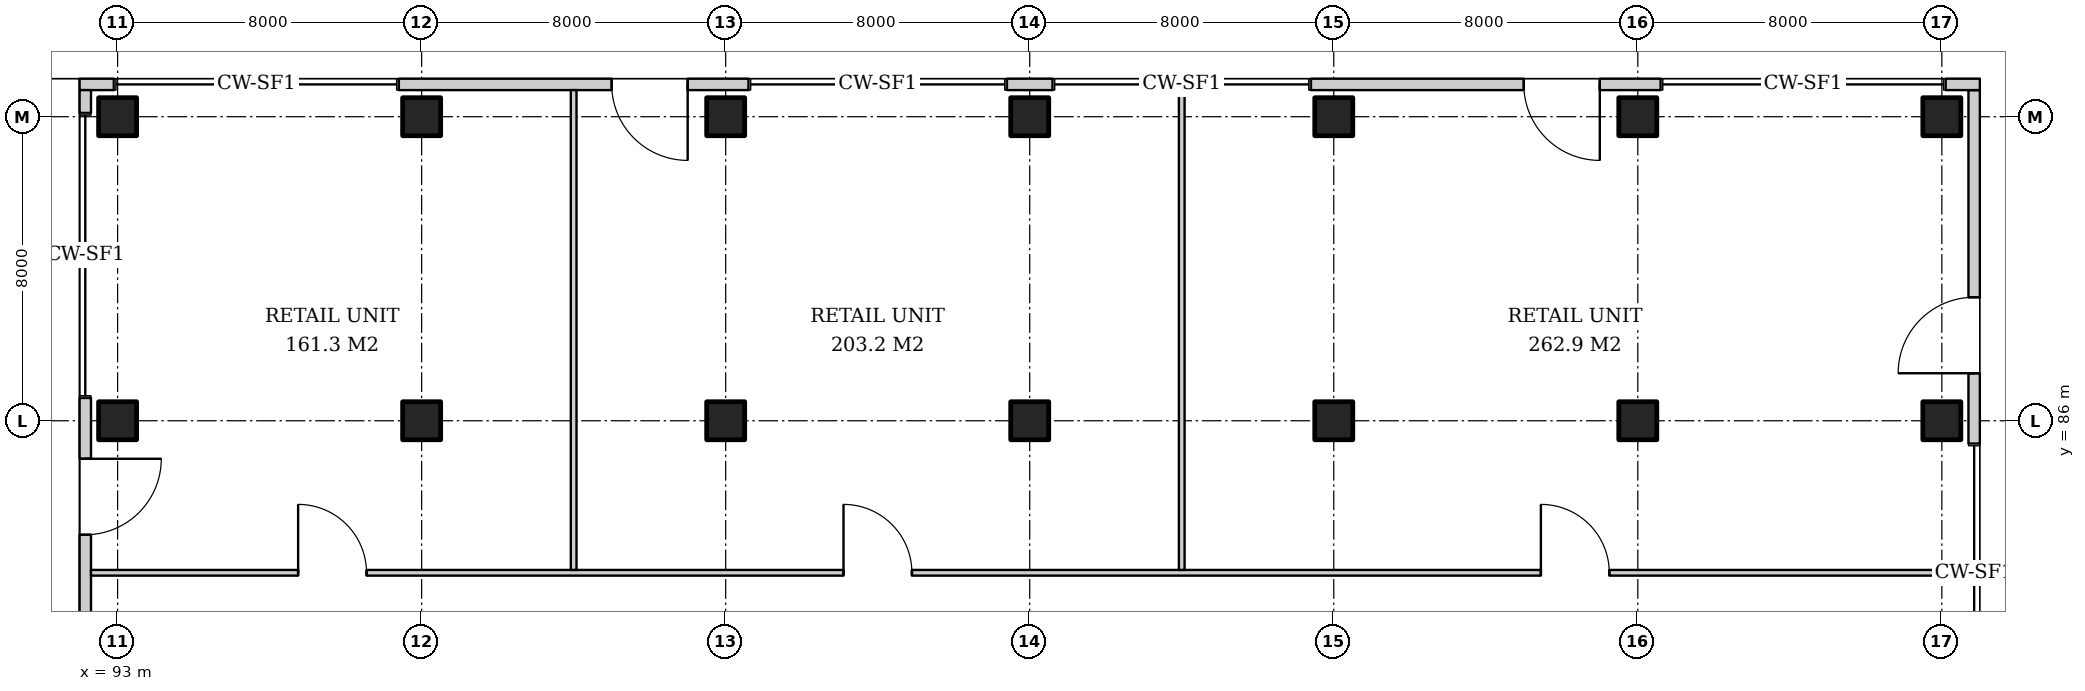
"""IFC4 building model, lengths in metres.
Left out: names, types, materials, properties, quantities, classifications, styles, units other than length and angle.
Written with IfcOpenShell. Run it as: python <this file> out.ifc"""

import sys

from ifc_helpers import new_model, si_unit, direction, frame, frame_2d, origin, origin_2d, place, context, subcontext, project, spatial, rectangle, extrude, element, fill, save


model = new_model("IFC4")
c1 = context("Model", 3, precision=1e-05, world=origin(), true_north=direction((0.0, 1.0)))
c2 = subcontext(c1, "Body", "Model", "MODEL_VIEW")
j1 = project(units=[si_unit("LENGTHUNIT", "METRE"), si_unit("PLANEANGLEUNIT", "RADIAN")], contexts=[c1])
p1 = place(None, origin())
s1 = spatial("IfcSite", under=j1, at=p1, CompositionType="ELEMENT")
p2 = place(p1, origin())
s2 = spatial("IfcBuilding", under=s1, at=p2, CompositionType="ELEMENT")
p3 = place(p2, origin())
s3 = spatial("IfcBuildingStorey", under=s2, at=p3, CompositionType="ELEMENT", Elevation=0.0)
for number, where, z_axis, x_axis in (
    (1, (93.0, 86.0, 0.0), (0.0, 0.0, 1.0), (1.0, 0.0, 0.0)),
    (2, (93.0, 94.0, 0.0), (0.0, 0.0, 1.0), (1.0, 0.0, 0.0)),
    (3, (101.0, 86.0, 0.0), (0.0, 0.0, 1.0), (1.0, 0.0, 0.0)),
    (4, (101.0, 94.0, 0.0), (0.0, 0.0, 1.0), (1.0, 0.0, 0.0)),
    (5, (109.0, 86.0, 0.0), (0.0, 0.0, 1.0), (1.0, 0.0, 0.0)),
    (6, (109.0, 94.0, 0.0), (0.0, 0.0, 1.0), (1.0, 0.0, 0.0)),
    (7, (117.0, 86.0, 0.0), (0.0, 0.0, 1.0), (1.0, 0.0, 0.0)),
    (8, (117.0, 94.0, 0.0), (0.0, 0.0, 1.0), (1.0, 0.0, 0.0)),
    (9, (125.0, 86.0, 0.0), (0.0, 0.0, 1.0), (1.0, 0.0, 0.0)),
    (10, (125.0, 94.0, 0.0), (0.0, 0.0, 1.0), (1.0, 0.0, 0.0)),
    (11, (133.0, 86.0, 0.0), (0.0, 0.0, 1.0), (1.0, 0.0, 0.0)),
    (12, (133.0, 94.0, 0.0), (0.0, 0.0, 1.0), (1.0, 0.0, 0.0)),
    (13, (141.0, 86.0, 0.0), (0.0, 0.0, 1.0), (1.0, 0.0, 0.0)),
    (14, (141.0, 94.0, 0.0), (0.0, 0.0, 1.0), (1.0, 0.0, 0.0)),
):
    element("IfcColumn", number, at=place(p3, frame(where, z_axis=z_axis, x_axis=x_axis)), inside=s3, PredefinedType="COLUMN", context=c2, shape_type="SweptSolid", body=[
        extrude(rectangle(XDim=1.0, YDim=1.0, at=origin_2d()), origin(), (0.0, 0.0, 1.0), 6.0),
    ])
p4 = place(p3, frame((141.85, 85.4, 0.0), z_axis=(0.0, 0.0, 1.0), x_axis=(0.0, 1.0, 0.0)))
e15 = element("IfcWall", 15, at=p4, inside=s3, PredefinedType="SOLIDWALL", context=c2, shape_type="SweptSolid", body=[
    extrude(rectangle(XDim=9.3, YDim=0.3, at=frame_2d((4.65, 0.0))), origin(), (0.0, 0.0, 1.0), 5.7),
])
p5 = place(p4, frame((1.85, 0.0, 0.0)))
e16 = element("IfcOpeningElement", 16, at=p5, cuts=e15, PredefinedType="OPENING", context=c2, shape_type="SweptSolid", body=[
    extrude(rectangle(XDim=2.0, YDim=2.7, at=frame_2d((1.0, 1.35))), frame((0.0, 0.16, 0.0), z_axis=(0.0, -1.0, 0.0), x_axis=(1.0, 0.0, 0.0)), (0.0, 0.0, 1.0), 0.32),
])
p6 = place(p3, frame((142.0, 94.85, 0.0), z_axis=(0.0, 0.0, 1.0), x_axis=(-1.0, 0.0, 0.0)))
e17 = element("IfcWall", 17, at=p6, inside=s3, PredefinedType="SOLIDWALL", context=c2, shape_type="SweptSolid", body=[
    extrude(rectangle(XDim=0.9, YDim=0.3, at=frame_2d((0.45, 0.0))), origin(), (0.0, 0.0, 1.0), 5.7),
])
p7 = place(p3, frame((133.6, 94.85, 0.0), z_axis=(0.0, 0.0, 1.0), x_axis=(-1.0, 0.0, 0.0)))
e18 = element("IfcWall", 18, at=p7, inside=s3, PredefinedType="SOLIDWALL", context=c2, shape_type="SweptSolid", body=[
    extrude(rectangle(XDim=9.2, YDim=0.3, at=frame_2d((4.6, 0.0))), origin(), (0.0, 0.0, 1.0), 5.7),
])
p8 = place(p7, frame((1.6, 0.0, 0.0)))
e19 = element("IfcOpeningElement", 19, at=p8, cuts=e18, PredefinedType="OPENING", context=c2, shape_type="SweptSolid", body=[
    extrude(rectangle(XDim=2.0, YDim=2.7, at=frame_2d((1.0, 1.35))), frame((0.0, 0.16, 0.0), z_axis=(0.0, -1.0, 0.0), x_axis=(1.0, 0.0, 0.0)), (0.0, 0.0, 1.0), 0.32),
])
p9 = place(p3, frame((117.6, 94.85, 0.0), z_axis=(0.0, 0.0, 1.0), x_axis=(-1.0, 0.0, 0.0)))
e20 = element("IfcWall", 20, at=p9, inside=s3, PredefinedType="SOLIDWALL", context=c2, shape_type="SweptSolid", body=[
    extrude(rectangle(XDim=1.2, YDim=0.3, at=frame_2d((0.6, 0.0))), origin(), (0.0, 0.0, 1.0), 5.7),
])
p10 = place(p3, frame((109.6, 94.85, 0.0), z_axis=(0.0, 0.0, 1.0), x_axis=(-1.0, 0.0, 0.0)))
e21 = element("IfcWall", 21, at=p10, inside=s3, PredefinedType="SOLIDWALL", context=c2, shape_type="SweptSolid", body=[
    extrude(rectangle(XDim=9.2, YDim=0.3, at=frame_2d((4.6, 0.0))), origin(), (0.0, 0.0, 1.0), 5.7),
])
p11 = place(p10, frame((1.6, 0.0, 0.0)))
e22 = element("IfcOpeningElement", 22, at=p11, cuts=e21, PredefinedType="OPENING", context=c2, shape_type="SweptSolid", body=[
    extrude(rectangle(XDim=2.0, YDim=2.7, at=frame_2d((1.0, 1.35))), frame((0.0, 0.16, 0.0), z_axis=(0.0, -1.0, 0.0), x_axis=(1.0, 0.0, 0.0)), (0.0, 0.0, 1.0), 0.32),
])
p12 = place(p3, frame((92.9, 94.85, 0.0), z_axis=(0.0, 0.0, 1.0), x_axis=(-1.0, 0.0, 0.0)))
e23 = element("IfcWall", 23, at=p12, inside=s3, PredefinedType="SOLIDWALL", context=c2, shape_type="SweptSolid", body=[
    extrude(rectangle(XDim=0.9, YDim=0.3, at=frame_2d((0.45, 0.0))), origin(), (0.0, 0.0, 1.0), 5.7),
])
p13 = place(p3, frame((92.15, 94.7, 0.0), z_axis=(0.0, 0.0, 1.0), x_axis=(0.0, -1.0, 0.0)))
e24 = element("IfcWall", 24, at=p13, inside=s3, PredefinedType="SOLIDWALL", context=c2, shape_type="SweptSolid", body=[
    extrude(rectangle(XDim=0.6, YDim=0.3, at=frame_2d((0.3, 0.0))), origin(), (0.0, 0.0, 1.0), 5.7),
])
p14 = place(p3, frame((92.15, 86.6, 0.0), z_axis=(0.0, 0.0, 1.0), x_axis=(0.0, -1.0, 0.0)))
e25 = element("IfcWall", 25, at=p14, inside=s3, PredefinedType="SOLIDWALL", context=c2, shape_type="SweptSolid", body=[
    extrude(rectangle(XDim=17.2, YDim=0.3, at=frame_2d((8.6, 0.0))), origin(), (0.0, 0.0, 1.0), 5.7),
])
p15 = place(p14, frame((1.6, 0.0, 0.0)))
e26 = element("IfcOpeningElement", 26, at=p15, cuts=e25, PredefinedType="OPENING", context=c2, shape_type="SweptSolid", body=[
    extrude(rectangle(XDim=2.0, YDim=2.7, at=frame_2d((1.0, 1.35))), frame((0.0, 0.16, 0.0), z_axis=(0.0, -1.0, 0.0), x_axis=(1.0, 0.0, 0.0)), (0.0, 0.0, 1.0), 0.32),
])
p16 = place(p14, frame((9.6, 0.0, 0.0)))
e27 = element("IfcOpeningElement", 27, at=p16, cuts=e25, PredefinedType="OPENING", context=c2, shape_type="SweptSolid", body=[
    extrude(rectangle(XDim=2.0, YDim=2.7, at=frame_2d((1.0, 1.35))), frame((0.0, 0.16, 0.0), z_axis=(0.0, -1.0, 0.0), x_axis=(1.0, 0.0, 0.0)), (0.0, 0.0, 1.0), 0.32),
])
p17 = place(p3, frame((92.3, 82.0, 0.0), z_axis=(0.0, 0.0, 1.0), x_axis=(1.0, 0.0, 0.0)))
e28 = element("IfcWall", 28, at=p17, inside=s3, PredefinedType="PARTITIONING", context=c2, shape_type="SweptSolid", body=[
    extrude(rectangle(XDim=49.4, YDim=0.15, at=frame_2d((24.7, 0.0))), origin(), (0.0, 0.0, 1.0), 5.7),
])
p18 = place(p17, frame((5.45, 0.0, 0.0)))
e29 = element("IfcOpeningElement", 29, at=p18, cuts=e28, PredefinedType="OPENING", context=c2, shape_type="SweptSolid", body=[
    extrude(rectangle(XDim=1.8, YDim=2.4, at=frame_2d((0.9, 1.2))), frame((0.0, 0.085, 0.0), z_axis=(0.0, -1.0, 0.0), x_axis=(1.0, 0.0, 0.0)), (0.0, 0.0, 1.0), 0.17),
])
p19 = place(p17, frame((19.8, 0.0, 0.0)))
e30 = element("IfcOpeningElement", 30, at=p19, cuts=e28, PredefinedType="OPENING", context=c2, shape_type="SweptSolid", body=[
    extrude(rectangle(XDim=1.8, YDim=2.4, at=frame_2d((0.9, 1.2))), frame((0.0, 0.085, 0.0), z_axis=(0.0, -1.0, 0.0), x_axis=(1.0, 0.0, 0.0)), (0.0, 0.0, 1.0), 0.17),
])
p20 = place(p17, frame((38.15, 0.0, 0.0)))
e31 = element("IfcOpeningElement", 31, at=p20, cuts=e28, PredefinedType="OPENING", context=c2, shape_type="SweptSolid", body=[
    extrude(rectangle(XDim=1.8, YDim=2.4, at=frame_2d((0.9, 1.2))), frame((0.0, 0.085, 0.0), z_axis=(0.0, -1.0, 0.0), x_axis=(1.0, 0.0, 0.0)), (0.0, 0.0, 1.0), 0.17),
])
for number, where, z_axis, x_axis in (
    (32, (105.0, 82.075, 0.0), (0.0, 0.0, 1.0), (0.0, 1.0, 0.0)),
    (33, (121.0, 82.075, 0.0), (0.0, 0.0, 1.0), (0.0, 1.0, 0.0)),
):
    element("IfcWall", number, at=place(p3, frame(where, z_axis=z_axis, x_axis=x_axis)), inside=s3, PredefinedType="PARTITIONING", context=c2, shape_type="SweptSolid", body=[
        extrude(rectangle(XDim=12.625, YDim=0.15, at=frame_2d((6.312, 0.0))), origin(), (0.0, 0.0, 1.0), 4.2),
    ])
p21 = place(p5, origin())
e34 = element("IfcDoor", 34, at=p21, inside=s3, OperationType="DOUBLE_DOOR_SINGLE_SWING", PredefinedType="DOOR", context=c2, shape_type="SweptSolid", body=[
    extrude(rectangle(XDim=2.0, YDim=2.7, at=frame_2d((1.0, 1.35))), frame((0.0, 0.025, 0.0), z_axis=(0.0, -1.0, 0.0), x_axis=(1.0, 0.0, 0.0)), (0.0, 0.0, 1.0), 0.05),
])
fill(e16, e34)
p22 = place(p8, origin())
e35 = element("IfcDoor", 35, at=p22, inside=s3, OperationType="DOUBLE_DOOR_SINGLE_SWING", PredefinedType="DOOR", context=c2, shape_type="SweptSolid", body=[
    extrude(rectangle(XDim=2.0, YDim=2.7, at=frame_2d((1.0, 1.35))), frame((0.0, 0.025, 0.0), z_axis=(0.0, -1.0, 0.0), x_axis=(1.0, 0.0, 0.0)), (0.0, 0.0, 1.0), 0.05),
])
fill(e19, e35)
p23 = place(p11, origin())
e36 = element("IfcDoor", 36, at=p23, inside=s3, OperationType="DOUBLE_DOOR_SINGLE_SWING", PredefinedType="DOOR", context=c2, shape_type="SweptSolid", body=[
    extrude(rectangle(XDim=2.0, YDim=2.7, at=frame_2d((1.0, 1.35))), frame((0.0, 0.025, 0.0), z_axis=(0.0, -1.0, 0.0), x_axis=(1.0, 0.0, 0.0)), (0.0, 0.0, 1.0), 0.05),
])
fill(e22, e36)
p24 = place(p15, origin())
e37 = element("IfcDoor", 37, at=p24, inside=s3, OperationType="DOUBLE_DOOR_SINGLE_SWING", PredefinedType="DOOR", context=c2, shape_type="SweptSolid", body=[
    extrude(rectangle(XDim=2.0, YDim=2.7, at=frame_2d((1.0, 1.35))), frame((0.0, 0.025, 0.0), z_axis=(0.0, -1.0, 0.0), x_axis=(1.0, 0.0, 0.0)), (0.0, 0.0, 1.0), 0.05),
])
fill(e26, e37)
p25 = place(p18, origin())
e38 = element("IfcDoor", 38, at=p25, inside=s3, OperationType="DOUBLE_DOOR_SINGLE_SWING", PredefinedType="DOOR", context=c2, shape_type="SweptSolid", body=[
    extrude(rectangle(XDim=1.8, YDim=2.4, at=frame_2d((0.9, 1.2))), frame((0.0, 0.025, 0.0), z_axis=(0.0, -1.0, 0.0), x_axis=(1.0, 0.0, 0.0)), (0.0, 0.0, 1.0), 0.05),
])
fill(e29, e38)
p26 = place(p19, origin())
e39 = element("IfcDoor", 39, at=p26, inside=s3, OperationType="DOUBLE_DOOR_SINGLE_SWING", PredefinedType="DOOR", context=c2, shape_type="SweptSolid", body=[
    extrude(rectangle(XDim=1.8, YDim=2.4, at=frame_2d((0.9, 1.2))), frame((0.0, 0.025, 0.0), z_axis=(0.0, -1.0, 0.0), x_axis=(1.0, 0.0, 0.0)), (0.0, 0.0, 1.0), 0.05),
])
fill(e30, e39)
p27 = place(p20, origin())
e40 = element("IfcDoor", 40, at=p27, inside=s3, OperationType="DOUBLE_DOOR_SINGLE_SWING", PredefinedType="DOOR", context=c2, shape_type="SweptSolid", body=[
    extrude(rectangle(XDim=1.8, YDim=2.4, at=frame_2d((0.9, 1.2))), frame((0.0, 0.025, 0.0), z_axis=(0.0, -1.0, 0.0), x_axis=(1.0, 0.0, 0.0)), (0.0, 0.0, 1.0), 0.05),
])
fill(e31, e40)
save(model, sys.argv[1])
